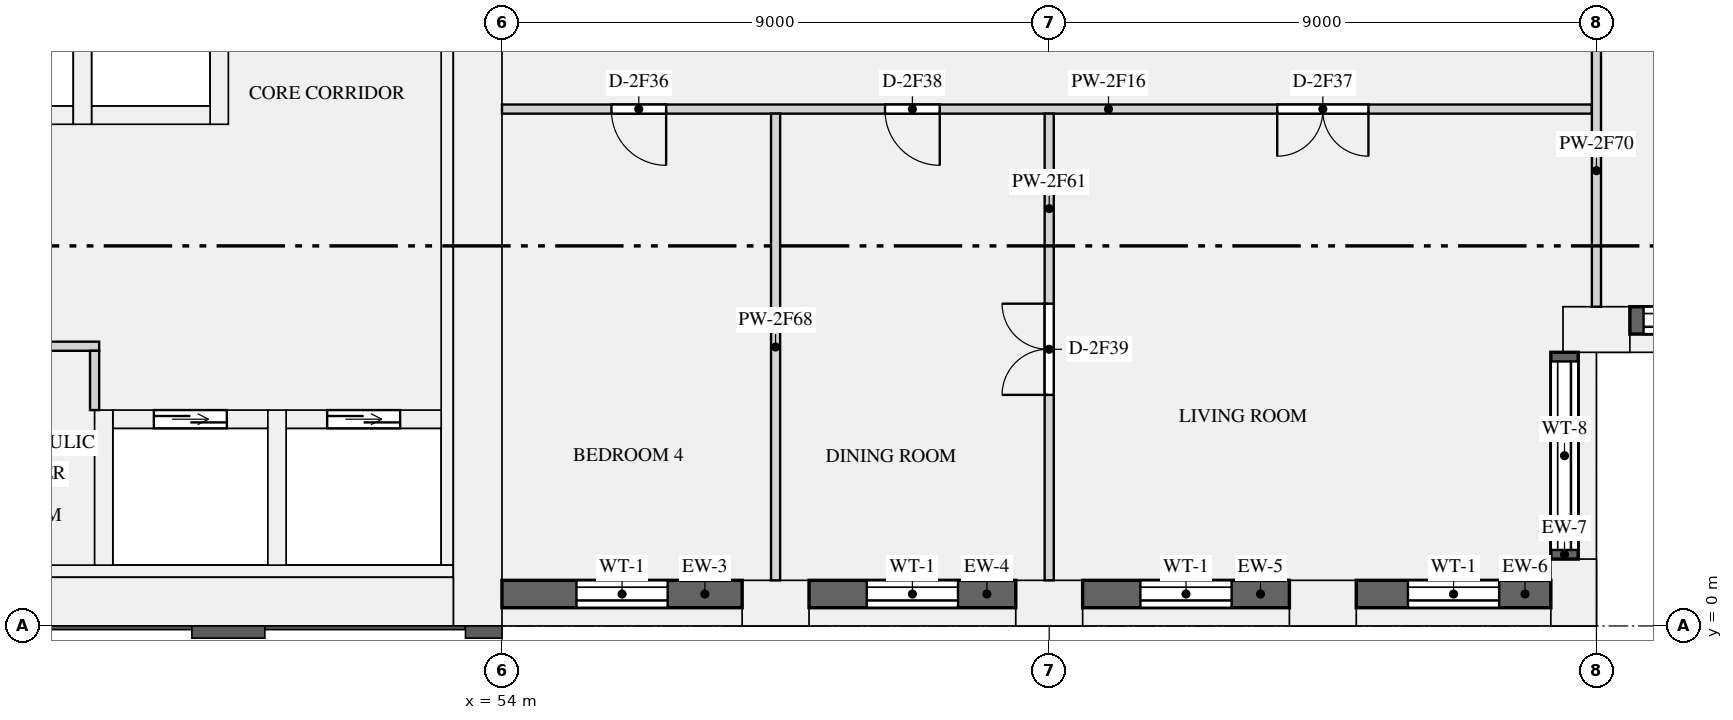
"""IFC4 building model, lengths in metres.
Left out: names, types, materials, properties, quantities, classifications, styles, units other than length and angle.
Written with IfcOpenShell. Run it as: python <this file> out.ifc"""

import sys

from ifc_helpers import new_model, si_unit, direction, frame, frame_2d, origin, origin_2d, place, context, subcontext, project, spatial, rectangle, extrude, element, fill, save


model = new_model("IFC4")
c1 = context("Model", 3, precision=1e-05, world=origin(), true_north=direction((0.0, 1.0)))
c2 = subcontext(c1, "Body", "Model", "MODEL_VIEW")
j1 = project(units=[si_unit("LENGTHUNIT", "METRE"), si_unit("PLANEANGLEUNIT", "RADIAN")], contexts=[c1])
p1 = place(None, origin())
s1 = spatial("IfcSite", under=j1, at=p1, CompositionType="ELEMENT")
p2 = place(p1, origin())
s2 = spatial("IfcBuilding", under=s1, at=p2, CompositionType="ELEMENT")
p3 = place(p2, frame((0.0, 0.0, 124.5)))
s3 = spatial("IfcBuildingStorey", under=s2, at=p3, CompositionType="ELEMENT", Elevation=124.5)
for number, where, z_axis, x_axis in (
    (1, (58.5, 0.375, 0.0), (0.0, 0.0, 1.0), (1.0, 0.0, 0.0)),
    (2, (63.0, 0.375, 0.0), (0.0, 0.0, 1.0), (1.0, 0.0, 0.0)),
    (3, (67.5, 0.375, 0.0), (0.0, 0.0, 1.0), (1.0, 0.0, 0.0)),
    (4, (71.625, 0.55, 0.0), (0.0, 0.0, 1.0), (0.0, 1.0, 0.0)),
    (5, (72.0, 4.875, 0.0), (0.0, 0.0, 1.0), (1.0, 0.0, 0.0)),
):
    element("IfcColumn", number, at=place(p3, frame(where, z_axis=z_axis, x_axis=x_axis)), inside=s3, PredefinedType="USERDEFINED", context=c2, shape_type="SweptSolid", body=[
        extrude(rectangle(XDim=1.1, YDim=0.75, at=origin_2d()), origin(), (0.0, 0.0, 1.0), 3.15),
    ])
p4 = place(p3, frame((53.6, 0.0, 0.0), z_axis=(0.0, 0.0, 1.0), x_axis=(0.0, 1.0, 0.0)))
e6 = element("IfcWall", 6, at=p4, inside=s3, PredefinedType="SHEAR", context=c2, shape_type="SweptSolid", body=[
    extrude(rectangle(XDim=12.5, YDim=0.8, at=frame_2d((6.25, 0.0))), origin(), (0.0, 0.0, 1.0), 3.15),
])
p5 = place(p3, frame((18.8, 0.4, 0.0), z_axis=(0.0, 0.0, 1.0), x_axis=(1.0, 0.0, 0.0)))
e7 = element("IfcWall", 7, at=p5, inside=s3, PredefinedType="SHEAR", context=c2, shape_type="SweptSolid", body=[
    extrude(rectangle(XDim=34.4, YDim=0.8, at=frame_2d((17.2, 0.0))), origin(), (0.0, 0.0, 1.0), 3.15),
])
p6 = place(p3, frame((53.1, 1.0, 0.0), z_axis=(0.0, 0.0, 1.0), x_axis=(0.0, 1.0, 0.0)))
e8 = element("IfcWall", 8, at=p6, inside=s3, PredefinedType="SHEAR", context=c2, shape_type="SweptSolid", body=[
    extrude(rectangle(XDim=10.9, YDim=0.2, at=frame_2d((5.45, 0.0))), origin(), (0.0, 0.0, 1.0), 3.15),
])
p7 = place(p3, frame((18.8, 0.9, 0.0), z_axis=(0.0, 0.0, 1.0), x_axis=(1.0, 0.0, 0.0)))
e9 = element("IfcWall", 9, at=p7, inside=s3, PredefinedType="SHEAR", context=c2, shape_type="SweptSolid", body=[
    extrude(rectangle(XDim=34.4, YDim=0.2, at=frame_2d((17.2, 0.0))), origin(), (0.0, 0.0, 1.0), 3.15),
])
for number, where, z_axis, x_axis in (
    (10, (45.0, 8.4, 0.0), (0.0, 0.0, 1.0), (1.0, 0.0, 0.0)),
    (11, (47.25, 8.4, 0.0), (0.0, 0.0, 1.0), (1.0, 0.0, 0.0)),
):
    element("IfcWall", number, at=place(p3, frame(where, z_axis=z_axis, x_axis=x_axis)), inside=s3, PredefinedType="SHEAR", context=c2, shape_type="SweptSolid", body=[
        extrude(rectangle(XDim=1.95, YDim=0.3, at=frame_2d((0.975, 0.0))), origin(), (0.0, 0.0, 1.0), 3.15),
    ])
for number, where, z_axis, x_axis in (
    (12, (47.1, 8.25, 0.0), (0.0, 0.0, 1.0), (0.0, 1.0, 0.0)),
    (13, (49.35, 8.25, 0.0), (0.0, 0.0, 1.0), (0.0, 1.0, 0.0)),
):
    element("IfcWall", number, at=place(p3, frame(where, z_axis=z_axis, x_axis=x_axis)), inside=s3, PredefinedType="SHEAR", context=c2, shape_type="SweptSolid", body=[
        extrude(rectangle(XDim=3.65, YDim=0.3, at=frame_2d((1.825, 0.0))), origin(), (0.0, 0.0, 1.0), 3.15),
    ])
p8 = place(p3, frame((47.6, 3.4, 0.0), z_axis=(0.0, 0.0, 1.0), x_axis=(1.0, 0.0, 0.0)))
e14 = element("IfcWall", 14, at=p8, inside=s3, PredefinedType="SHEAR", context=c2, shape_type="SweptSolid", body=[
    extrude(rectangle(XDim=2.55, YDim=0.3, at=frame_2d((1.275, 0.0))), origin(), (0.0, 0.0, 1.0), 3.15),
])
p9 = place(p8, frame((0.675, 0.0, 0.0)))
e15 = element("IfcOpeningElement", 15, at=p9, cuts=e14, PredefinedType="OPENING", context=c2, shape_type="SweptSolid", body=[
    extrude(rectangle(XDim=1.2, YDim=2.1, at=frame_2d((0.6, 1.05))), frame((0.0, 0.16, 0.0), z_axis=(0.0, -1.0, 0.0), x_axis=(1.0, 0.0, 0.0)), (0.0, 0.0, 1.0), 0.32),
])
p10 = place(p3, frame((47.45, 1.0, 0.0), z_axis=(0.0, 0.0, 1.0), x_axis=(0.0, 1.0, 0.0)))
e16 = element("IfcWall", 16, at=p10, inside=s3, PredefinedType="SHEAR", context=c2, shape_type="SweptSolid", body=[
    extrude(rectangle(XDim=2.55, YDim=0.3, at=frame_2d((1.275, 0.0))), origin(), (0.0, 0.0, 1.0), 3.15),
])
p11 = place(p3, frame((50.45, 3.4, 0.0), z_axis=(0.0, 0.0, 1.0), x_axis=(1.0, 0.0, 0.0)))
e17 = element("IfcWall", 17, at=p11, inside=s3, PredefinedType="SHEAR", context=c2, shape_type="SweptSolid", body=[
    extrude(rectangle(XDim=2.55, YDim=0.3, at=frame_2d((1.275, 0.0))), origin(), (0.0, 0.0, 1.0), 3.15),
])
p12 = place(p11, frame((0.675, 0.0, 0.0)))
e18 = element("IfcOpeningElement", 18, at=p12, cuts=e17, PredefinedType="OPENING", context=c2, shape_type="SweptSolid", body=[
    extrude(rectangle(XDim=1.2, YDim=2.1, at=frame_2d((0.6, 1.05))), frame((0.0, 0.16, 0.0), z_axis=(0.0, -1.0, 0.0), x_axis=(1.0, 0.0, 0.0)), (0.0, 0.0, 1.0), 0.32),
])
p13 = place(p3, frame((50.3, 1.0, 0.0), z_axis=(0.0, 0.0, 1.0), x_axis=(0.0, 1.0, 0.0)))
e19 = element("IfcWall", 19, at=p13, inside=s3, PredefinedType="SHEAR", context=c2, shape_type="SweptSolid", body=[
    extrude(rectangle(XDim=2.55, YDim=0.3, at=frame_2d((1.275, 0.0))), origin(), (0.0, 0.0, 1.0), 3.15),
])
p14 = place(p3, frame((54.0, 0.525, 0.9), z_axis=(0.0, 0.0, 1.0), x_axis=(1.0, 0.0, 0.0)))
e20 = element("IfcWall", 20, at=p14, inside=s3, PredefinedType="SOLIDWALL", context=c2, shape_type="SweptSolid", body=[
    extrude(rectangle(XDim=3.95, YDim=0.45, at=frame_2d((1.975, 0.0))), origin(), (0.0, 0.0, 1.0), 1.93),
])
p15 = place(p14, frame((1.225, 0.0, 0.15)))
e21 = element("IfcOpeningElement", 21, at=p15, cuts=e20, PredefinedType="OPENING", context=c2, shape_type="SweptSolid", body=[
    extrude(rectangle(XDim=1.5, YDim=1.5, at=frame_2d((0.75, 0.75))), frame((0.0, 0.235, 0.0), z_axis=(0.0, -1.0, 0.0), x_axis=(1.0, 0.0, 0.0)), (0.0, 0.0, 1.0), 0.47),
])
p16 = place(p3, frame((59.05, 0.525, 0.9), z_axis=(0.0, 0.0, 1.0), x_axis=(1.0, 0.0, 0.0)))
e22 = element("IfcWall", 22, at=p16, inside=s3, PredefinedType="SOLIDWALL", context=c2, shape_type="SweptSolid", body=[
    extrude(rectangle(XDim=3.4, YDim=0.45, at=frame_2d((1.7, 0.0))), origin(), (0.0, 0.0, 1.0), 1.93),
])
p17 = place(p16, frame((0.95, 0.0, 0.15)))
e23 = element("IfcOpeningElement", 23, at=p17, cuts=e22, PredefinedType="OPENING", context=c2, shape_type="SweptSolid", body=[
    extrude(rectangle(XDim=1.5, YDim=1.5, at=frame_2d((0.75, 0.75))), frame((0.0, 0.235, 0.0), z_axis=(0.0, -1.0, 0.0), x_axis=(1.0, 0.0, 0.0)), (0.0, 0.0, 1.0), 0.47),
])
p18 = place(p3, frame((63.55, 0.525, 0.9), z_axis=(0.0, 0.0, 1.0), x_axis=(1.0, 0.0, 0.0)))
e24 = element("IfcWall", 24, at=p18, inside=s3, PredefinedType="SOLIDWALL", context=c2, shape_type="SweptSolid", body=[
    extrude(rectangle(XDim=3.4, YDim=0.45, at=frame_2d((1.7, 0.0))), origin(), (0.0, 0.0, 1.0), 1.93),
])
p19 = place(p18, frame((0.95, 0.0, 0.15)))
e25 = element("IfcOpeningElement", 25, at=p19, cuts=e24, PredefinedType="OPENING", context=c2, shape_type="SweptSolid", body=[
    extrude(rectangle(XDim=1.5, YDim=1.5, at=frame_2d((0.75, 0.75))), frame((0.0, 0.235, 0.0), z_axis=(0.0, -1.0, 0.0), x_axis=(1.0, 0.0, 0.0)), (0.0, 0.0, 1.0), 0.47),
])
p20 = place(p3, frame((68.05, 0.525, 0.9), z_axis=(0.0, 0.0, 1.0), x_axis=(1.0, 0.0, 0.0)))
e26 = element("IfcWall", 26, at=p20, inside=s3, PredefinedType="SOLIDWALL", context=c2, shape_type="SweptSolid", body=[
    extrude(rectangle(XDim=3.2, YDim=0.45, at=frame_2d((1.6, 0.0))), origin(), (0.0, 0.0, 1.0), 1.93),
])
p21 = place(p20, frame((0.85, 0.0, 0.15)))
e27 = element("IfcOpeningElement", 27, at=p21, cuts=e26, PredefinedType="OPENING", context=c2, shape_type="SweptSolid", body=[
    extrude(rectangle(XDim=1.5, YDim=1.5, at=frame_2d((0.75, 0.75))), frame((0.0, 0.235, 0.0), z_axis=(0.0, -1.0, 0.0), x_axis=(1.0, 0.0, 0.0)), (0.0, 0.0, 1.0), 0.47),
])
p22 = place(p3, frame((71.475, 1.1, 0.9), z_axis=(0.0, 0.0, 1.0), x_axis=(0.0, 1.0, 0.0)))
e28 = element("IfcWall", 28, at=p22, inside=s3, PredefinedType="SOLIDWALL", context=c2, shape_type="SweptSolid", body=[
    extrude(rectangle(XDim=3.4, YDim=0.45, at=frame_2d((1.7, 0.0))), origin(), (0.0, 0.0, 1.0), 1.93),
])
p23 = place(p22, frame((0.15, 0.0, 0.15)))
e29 = element("IfcOpeningElement", 29, at=p23, cuts=e28, PredefinedType="OPENING", context=c2, shape_type="SweptSolid", body=[
    extrude(rectangle(XDim=3.1, YDim=1.5, at=frame_2d((1.55, 0.75))), frame((0.0, 0.235, 0.0), z_axis=(0.0, -1.0, 0.0), x_axis=(1.0, 0.0, 0.0)), (0.0, 0.0, 1.0), 0.47),
])
p24 = place(p3, frame((72.55, 5.025, 0.9), z_axis=(0.0, 0.0, 1.0), x_axis=(1.0, 0.0, 0.0)))
e30 = element("IfcWall", 30, at=p24, inside=s3, PredefinedType="SOLIDWALL", context=c2, shape_type="SweptSolid", body=[
    extrude(rectangle(XDim=3.2, YDim=0.45, at=frame_2d((1.6, 0.0))), origin(), (0.0, 0.0, 1.0), 1.93),
])
p25 = place(p24, frame((0.225, 0.0, 0.15)))
e31 = element("IfcOpeningElement", 31, at=p25, cuts=e30, PredefinedType="OPENING", context=c2, shape_type="SweptSolid", body=[
    extrude(rectangle(XDim=2.75, YDim=1.5, at=frame_2d((1.375, 0.75))), frame((0.0, 0.235, 0.0), z_axis=(0.0, -1.0, 0.0), x_axis=(1.0, 0.0, 0.0)), (0.0, 0.0, 1.0), 0.47),
])
p26 = place(p3, frame((44.7, 4.6, 0.0), z_axis=(0.0, 0.0, 1.0), x_axis=(1.0, 0.0, 0.0)))
e32 = element("IfcWall", 32, at=p26, inside=s3, PredefinedType="PARTITIONING", context=c2, shape_type="SweptSolid", body=[
    extrude(rectangle(XDim=2.675, YDim=0.15, at=frame_2d((1.337, 0.0))), origin(), (0.0, 0.0, 1.0), 2.83),
])
p27 = place(p26, frame((0.35, 0.0, 0.0)))
e33 = element("IfcOpeningElement", 33, at=p27, cuts=e32, PredefinedType="OPENING", context=c2, shape_type="SweptSolid", body=[
    extrude(rectangle(XDim=0.9, YDim=2.1, at=frame_2d((0.45, 1.05))), frame((0.0, 0.085, 0.0), z_axis=(0.0, -1.0, 0.0), x_axis=(1.0, 0.0, 0.0)), (0.0, 0.0, 1.0), 0.17),
])
p28 = place(p3, frame((47.3, 3.55, 0.0), z_axis=(0.0, 0.0, 1.0), x_axis=(0.0, 1.0, 0.0)))
e34 = element("IfcWall", 34, at=p28, inside=s3, PredefinedType="PARTITIONING", context=c2, shape_type="SweptSolid", body=[
    extrude(rectangle(XDim=0.975, YDim=0.15, at=frame_2d((0.487, 0.0))), origin(), (0.0, 0.0, 1.0), 2.83),
])
p29 = place(p3, frame((54.0, 8.5, 0.0), z_axis=(0.0, 0.0, 1.0), x_axis=(1.0, 0.0, 0.0)))
e35 = element("IfcWall", 35, at=p29, inside=s3, PredefinedType="PARTITIONING", context=c2, shape_type="SweptSolid", body=[
    extrude(rectangle(XDim=17.925, YDim=0.15, at=frame_2d((8.962, 0.0))), origin(), (0.0, 0.0, 1.0), 2.83),
])
p30 = place(p29, frame((1.8, 0.0, 0.0)))
e36 = element("IfcOpeningElement", 36, at=p30, cuts=e35, PredefinedType="OPENING", context=c2, shape_type="SweptSolid", body=[
    extrude(rectangle(XDim=0.9, YDim=2.1, at=frame_2d((0.45, 1.05))), frame((0.0, 0.085, 0.0), z_axis=(0.0, -1.0, 0.0), x_axis=(1.0, 0.0, 0.0)), (0.0, 0.0, 1.0), 0.17),
])
p31 = place(p29, frame((12.75, 0.0, 0.0)))
e37 = element("IfcOpeningElement", 37, at=p31, cuts=e35, PredefinedType="OPENING", context=c2, shape_type="SweptSolid", body=[
    extrude(rectangle(XDim=1.5, YDim=2.1, at=frame_2d((0.75, 1.05))), frame((0.0, 0.085, 0.0), z_axis=(0.0, -1.0, 0.0), x_axis=(1.0, 0.0, 0.0)), (0.0, 0.0, 1.0), 0.17),
])
p32 = place(p29, frame((6.3, 0.0, 0.0)))
e38 = element("IfcOpeningElement", 38, at=p32, cuts=e35, PredefinedType="OPENING", context=c2, shape_type="SweptSolid", body=[
    extrude(rectangle(XDim=0.9, YDim=2.1, at=frame_2d((0.45, 1.05))), frame((0.0, 0.085, 0.0), z_axis=(0.0, -1.0, 0.0), x_axis=(1.0, 0.0, 0.0)), (0.0, 0.0, 1.0), 0.17),
])
p33 = place(p3, frame((63.0, 0.75, 0.0), z_axis=(0.0, 0.0, 1.0), x_axis=(0.0, 1.0, 0.0)))
e39 = element("IfcWall", 39, at=p33, inside=s3, PredefinedType="PARTITIONING", context=c2, shape_type="SweptSolid", body=[
    extrude(rectangle(XDim=7.675, YDim=0.15, at=frame_2d((3.837, 0.0))), origin(), (0.0, 0.0, 1.0), 2.83),
])
p34 = place(p33, frame((3.05, 0.0, 0.0)))
e40 = element("IfcOpeningElement", 40, at=p34, cuts=e39, PredefinedType="OPENING", context=c2, shape_type="SweptSolid", body=[
    extrude(rectangle(XDim=1.5, YDim=2.1, at=frame_2d((0.75, 1.05))), frame((0.0, 0.085, 0.0), z_axis=(0.0, -1.0, 0.0), x_axis=(1.0, 0.0, 0.0)), (0.0, 0.0, 1.0), 0.17),
])
p35 = place(p3, frame((58.5, 0.75, 0.0), z_axis=(0.0, 0.0, 1.0), x_axis=(0.0, 1.0, 0.0)))
e41 = element("IfcWall", 41, at=p35, inside=s3, PredefinedType="PARTITIONING", context=c2, shape_type="SweptSolid", body=[
    extrude(rectangle(XDim=7.675, YDim=0.15, at=frame_2d((3.837, 0.0))), origin(), (0.0, 0.0, 1.0), 2.83),
])
p36 = place(p3, frame((72.0, 5.25, 0.0), z_axis=(0.0, 0.0, 1.0), x_axis=(0.0, 1.0, 0.0)))
e42 = element("IfcWall", 42, at=p36, inside=s3, PredefinedType="PARTITIONING", context=c2, shape_type="SweptSolid", body=[
    extrude(rectangle(XDim=11.175, YDim=0.15, at=frame_2d((5.587, 0.0))), origin(), (0.0, 0.0, 1.0), 2.83),
])
p37 = place(p36, frame((4.475, 0.0, 0.0)))
e43 = element("IfcOpeningElement", 43, at=p37, cuts=e42, PredefinedType="OPENING", context=c2, shape_type="SweptSolid", body=[
    extrude(rectangle(XDim=0.9, YDim=2.1, at=frame_2d((0.45, 1.05))), frame((0.0, 0.085, 0.0), z_axis=(0.0, -1.0, 0.0), x_axis=(1.0, 0.0, 0.0)), (0.0, 0.0, 1.0), 0.17),
])
p38 = place(p36, frame((9.125, 0.0, 0.0)))
e44 = element("IfcOpeningElement", 44, at=p38, cuts=e42, PredefinedType="OPENING", context=c2, shape_type="SweptSolid", body=[
    extrude(rectangle(XDim=0.9, YDim=2.1, at=frame_2d((0.45, 1.05))), frame((0.0, 0.085, 0.0), z_axis=(0.0, -1.0, 0.0), x_axis=(1.0, 0.0, 0.0)), (0.0, 0.0, 1.0), 0.17),
])
p39 = place(p15, origin())
e45 = element("IfcWindow", 45, at=p39, inside=s3, PartitioningType="SINGLE_PANEL", PredefinedType="WINDOW", context=c2, shape_type="SweptSolid", body=[
    extrude(rectangle(XDim=1.5, YDim=1.5, at=frame_2d((0.75, 0.75))), frame((0.0, -0.065, 0.0), z_axis=(0.0, -1.0, 0.0), x_axis=(1.0, 0.0, 0.0)), (0.0, 0.0, 1.0), 0.06),
])
fill(e21, e45)
p40 = place(p17, origin())
e46 = element("IfcWindow", 46, at=p40, inside=s3, PartitioningType="SINGLE_PANEL", PredefinedType="WINDOW", context=c2, shape_type="SweptSolid", body=[
    extrude(rectangle(XDim=1.5, YDim=1.5, at=frame_2d((0.75, 0.75))), frame((0.0, -0.065, 0.0), z_axis=(0.0, -1.0, 0.0), x_axis=(1.0, 0.0, 0.0)), (0.0, 0.0, 1.0), 0.06),
])
fill(e23, e46)
p41 = place(p19, origin())
e47 = element("IfcWindow", 47, at=p41, inside=s3, PartitioningType="SINGLE_PANEL", PredefinedType="WINDOW", context=c2, shape_type="SweptSolid", body=[
    extrude(rectangle(XDim=1.5, YDim=1.5, at=frame_2d((0.75, 0.75))), frame((0.0, -0.065, 0.0), z_axis=(0.0, -1.0, 0.0), x_axis=(1.0, 0.0, 0.0)), (0.0, 0.0, 1.0), 0.06),
])
fill(e25, e47)
p42 = place(p21, origin())
e48 = element("IfcWindow", 48, at=p42, inside=s3, PartitioningType="SINGLE_PANEL", PredefinedType="WINDOW", context=c2, shape_type="SweptSolid", body=[
    extrude(rectangle(XDim=1.5, YDim=1.5, at=frame_2d((0.75, 0.75))), frame((0.0, -0.065, 0.0), z_axis=(0.0, -1.0, 0.0), x_axis=(1.0, 0.0, 0.0)), (0.0, 0.0, 1.0), 0.06),
])
fill(e27, e48)
p43 = place(p23, origin())
e49 = element("IfcWindow", 49, at=p43, inside=s3, PartitioningType="SINGLE_PANEL", PredefinedType="WINDOW", context=c2, shape_type="SweptSolid", body=[
    extrude(rectangle(XDim=3.1, YDim=1.5, at=frame_2d((1.55, 0.75))), frame((0.0, -0.065, 0.0), z_axis=(0.0, -1.0, 0.0), x_axis=(1.0, 0.0, 0.0)), (0.0, 0.0, 1.0), 0.06),
])
fill(e29, e49)
p44 = place(p25, origin())
e50 = element("IfcWindow", 50, at=p44, inside=s3, PartitioningType="SINGLE_PANEL", PredefinedType="WINDOW", context=c2, shape_type="SweptSolid", body=[
    extrude(rectangle(XDim=2.75, YDim=1.5, at=frame_2d((1.375, 0.75))), frame((0.0, -0.065, 0.0), z_axis=(0.0, -1.0, 0.0), x_axis=(1.0, 0.0, 0.0)), (0.0, 0.0, 1.0), 0.06),
])
fill(e31, e50)
p45 = place(p9, origin())
e51 = element("IfcDoor", 51, at=p45, inside=s3, OperationType="DOUBLE_DOOR_SLIDING", PredefinedType="DOOR", context=c2, shape_type="SweptSolid", body=[
    extrude(rectangle(XDim=1.2, YDim=2.1, at=frame_2d((0.6, 1.05))), frame((0.0, 0.025, 0.0), z_axis=(0.0, -1.0, 0.0), x_axis=(1.0, 0.0, 0.0)), (0.0, 0.0, 1.0), 0.05),
])
fill(e15, e51)
p46 = place(p12, origin())
e52 = element("IfcDoor", 52, at=p46, inside=s3, OperationType="DOUBLE_DOOR_SLIDING", PredefinedType="DOOR", context=c2, shape_type="SweptSolid", body=[
    extrude(rectangle(XDim=1.2, YDim=2.1, at=frame_2d((0.6, 1.05))), frame((0.0, 0.025, 0.0), z_axis=(0.0, -1.0, 0.0), x_axis=(1.0, 0.0, 0.0)), (0.0, 0.0, 1.0), 0.05),
])
fill(e18, e52)
p47 = place(p30, frame((0.9, 0.0, 0.0), z_axis=(0.0, 0.0, 1.0), x_axis=(-1.0, 0.0, 0.0)))
e53 = element("IfcDoor", 53, at=p47, inside=s3, OperationType="SINGLE_SWING_LEFT", PredefinedType="DOOR", context=c2, shape_type="SweptSolid", body=[
    extrude(rectangle(XDim=0.9, YDim=2.1, at=frame_2d((0.45, 1.05))), frame((0.0, 0.025, 0.0), z_axis=(0.0, -1.0, 0.0), x_axis=(1.0, 0.0, 0.0)), (0.0, 0.0, 1.0), 0.05),
])
fill(e36, e53)
p48 = place(p31, frame((1.5, 0.0, 0.0), z_axis=(0.0, 0.0, 1.0), x_axis=(-1.0, 0.0, 0.0)))
e54 = element("IfcDoor", 54, at=p48, inside=s3, OperationType="DOUBLE_DOOR_SINGLE_SWING", PredefinedType="DOOR", context=c2, shape_type="SweptSolid", body=[
    extrude(rectangle(XDim=1.5, YDim=2.1, at=frame_2d((0.75, 1.05))), frame((0.0, 0.025, 0.0), z_axis=(0.0, -1.0, 0.0), x_axis=(1.0, 0.0, 0.0)), (0.0, 0.0, 1.0), 0.05),
])
fill(e37, e54)
p49 = place(p32, frame((0.9, 0.0, 0.0), z_axis=(0.0, 0.0, 1.0), x_axis=(-1.0, 0.0, 0.0)))
e55 = element("IfcDoor", 55, at=p49, inside=s3, OperationType="SINGLE_SWING_LEFT", PredefinedType="DOOR", context=c2, shape_type="SweptSolid", body=[
    extrude(rectangle(XDim=0.9, YDim=2.1, at=frame_2d((0.45, 1.05))), frame((0.0, 0.025, 0.0), z_axis=(0.0, -1.0, 0.0), x_axis=(1.0, 0.0, 0.0)), (0.0, 0.0, 1.0), 0.05),
])
fill(e38, e55)
p50 = place(p34, origin())
e56 = element("IfcDoor", 56, at=p50, inside=s3, OperationType="DOUBLE_DOOR_SINGLE_SWING", PredefinedType="DOOR", context=c2, shape_type="SweptSolid", body=[
    extrude(rectangle(XDim=1.5, YDim=2.1, at=frame_2d((0.75, 1.05))), frame((0.0, 0.025, 0.0), z_axis=(0.0, -1.0, 0.0), x_axis=(1.0, 0.0, 0.0)), (0.0, 0.0, 1.0), 0.05),
])
fill(e40, e56)
save(model, sys.argv[1])
